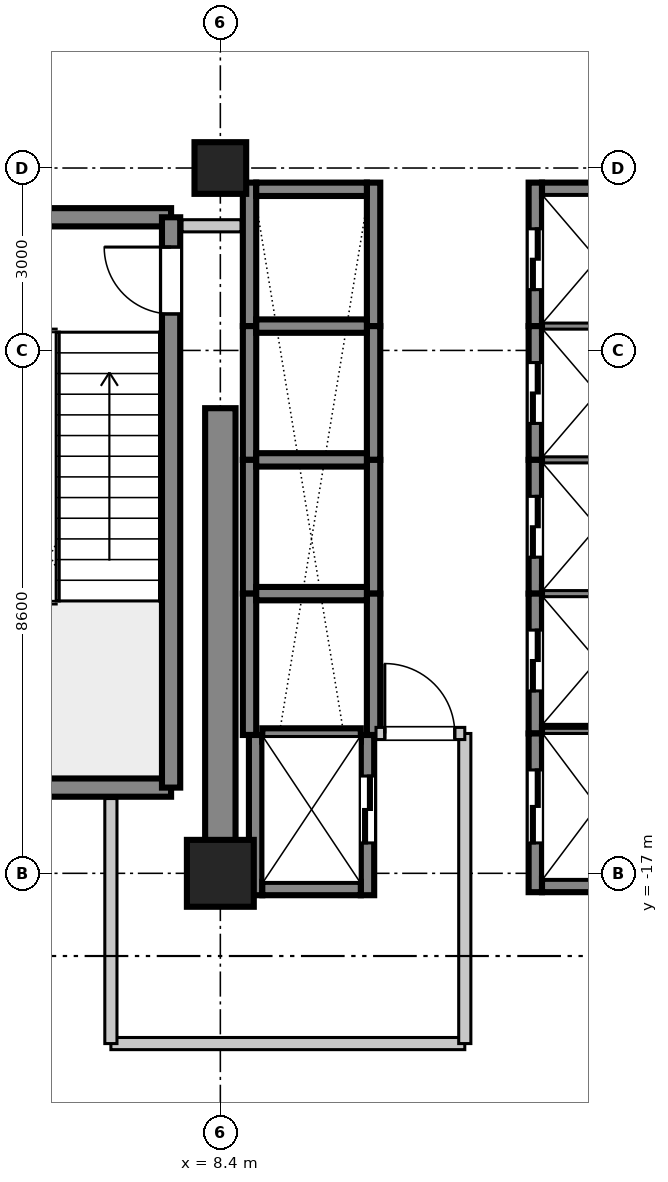
"""IFC4 building model, lengths in metres.
Left out: names, types, materials, properties, quantities, classifications, styles, units other than length and angle.
Written with IfcOpenShell. Run it as: python <this file> out.ifc"""

import sys

from ifc_helpers import new_model, si_unit, direction, frame, frame_2d, origin, origin_2d, place, context, subcontext, project, spatial, rectangle, extrude, source, transform, mapped, element, fill, save


model = new_model("IFC4")
c1 = context("Model", 3, precision=1e-05, world=origin(), true_north=direction((0.0, 1.0)))
c2 = subcontext(c1, "Body", "Model", "MODEL_VIEW")
j1 = project(units=[si_unit("LENGTHUNIT", "METRE"), si_unit("PLANEANGLEUNIT", "RADIAN")], contexts=[c1])
p1 = place(None, origin())
s1 = spatial("IfcSite", under=j1, at=p1, CompositionType="ELEMENT")
p2 = place(p1, origin())
s2 = spatial("IfcBuilding", under=s1, at=p2, CompositionType="ELEMENT")
p3 = place(p2, frame((0.0, 0.0, 200.1)))
s3 = spatial("IfcBuildingStorey", under=s2, at=p3, CompositionType="ELEMENT", Elevation=200.1)
m1 = source(origin(), c2, "Body", "SweptSolid", [
    extrude(rectangle(XDim=1.1, YDim=1.1, at=origin_2d()), origin(), (0.0, 0.0, 1.0), 4.755),
])
p4 = place(p3, frame((8.4, -17.0, 0.0), z_axis=(0.0, 0.0, 1.0), x_axis=(1.0, 0.0, 0.0)))
e1 = element("IfcColumn", 1, at=p4, inside=s3, PredefinedType="COLUMN", context=c2, shape_type="MappedRepresentation", body=[
    mapped(m1, transform((0.0, 0.0, 0.0), scale=1.0)),
])
m2 = source(origin(), c2, "Body", "SweptSolid", [
    extrude(rectangle(XDim=0.85, YDim=0.85, at=origin_2d()), origin(), (0.0, 0.0, 1.0), 4.755),
])
p5 = place(p3, frame((8.4, -5.4, 0.0), z_axis=(0.0, 0.0, 1.0), x_axis=(1.0, 0.0, 0.0)))
e2 = element("IfcColumn", 2, at=p5, inside=s3, PredefinedType="PILASTER", context=c2, shape_type="MappedRepresentation", body=[
    mapped(m2, transform((0.0, 0.0, 0.0), scale=1.0)),
])
m3 = source(origin(), c2, "Body", "SweptSolid", [
    extrude(rectangle(XDim=7.65, YDim=0.5, at=frame_2d((3.825, 0.0))), origin(), (0.0, 0.0, 1.0), 4.51),
])
p6 = place(p3, frame((8.4, -17.0, 0.0), z_axis=(0.0, 0.0, 1.0), x_axis=(0.0, 1.0, 0.0)))
e3 = element("IfcWall", 3, at=p6, inside=s3, PredefinedType="SHEAR", context=c2, shape_type="MappedRepresentation", body=[
    mapped(m3, transform((0.0, 0.0, 0.0), scale=1.0)),
])
m4 = source(origin(), c2, "Body", "SweptSolid", [
    extrude(rectangle(XDim=3.98, YDim=0.3, at=frame_2d((1.99, 0.0))), origin(), (0.0, 0.0, 1.0), 4.51),
])
for number, where, z_axis, x_axis in (
    (4, (3.61, -15.59, 0.0), (0.0, 0.0, 1.0), (1.0, 0.0, 0.0)),
    (5, (3.61, -6.21, 0.0), (0.0, 0.0, 1.0), (1.0, 0.0, 0.0)),
):
    element("IfcWall", number, at=place(p3, frame(where, z_axis=z_axis, x_axis=x_axis)), inside=s3, PredefinedType="SHEAR", context=c2, shape_type="MappedRepresentation", body=[
        mapped(m4, transform((0.0, 0.0, 0.0), scale=1.0)),
    ])
m5 = source(origin(), c2, "Body", "SweptSolid", [
    extrude(rectangle(XDim=9.38, YDim=0.3, at=frame_2d((4.69, 0.0))), origin(), (0.0, 0.0, 1.0), 4.51),
])
p7 = place(p3, frame((7.59, -15.59, 0.0), z_axis=(0.0, 0.0, 1.0), x_axis=(0.0, 1.0, 0.0)))
e6 = element("IfcWall", 6, at=p7, inside=s3, PredefinedType="SHEAR", context=c2, shape_type="MappedRepresentation", body=[
    mapped(m5, transform((0.0, 0.0, 0.0), scale=1.0)),
])
p8 = place(p7, frame((7.79, 0.0, 0.0)))
e7 = element("IfcOpeningElement", 7, at=p8, cuts=e6, PredefinedType="OPENING", context=c2, shape_type="SweptSolid", body=[
    extrude(rectangle(XDim=1.1, YDim=2.15, at=frame_2d((0.55, 1.075))), frame((0.0, 0.16, 0.0), z_axis=(0.0, -1.0, 0.0), x_axis=(1.0, 0.0, 0.0)), (0.0, 0.0, 1.0), 0.32),
])
m6 = source(origin(), c2, "Body", "SweptSolid", [
    extrude(rectangle(XDim=2.36, YDim=0.22, at=frame_2d((1.18, 0.0))), origin(), (0.0, 0.0, 1.0), 4.51),
])
p9 = place(p3, frame((13.58, -8.0, 0.0), z_axis=(0.0, 0.0, 1.0), x_axis=(0.0, 1.0, 0.0)))
e8 = element("IfcWall", 8, at=p9, inside=s3, PredefinedType="SHEAR", context=c2, shape_type="MappedRepresentation", body=[
    mapped(m6, transform((0.0, 0.0, 0.0), scale=1.0)),
])
p10 = place(p9, frame((0.6, 0.0, 0.0)))
e9 = element("IfcOpeningElement", 9, at=p10, cuts=e8, PredefinedType="OPENING", context=c2, shape_type="SweptSolid", body=[
    extrude(rectangle(XDim=1.0, YDim=2.2, at=frame_2d((0.5, 1.1))), frame((0.0, 0.12, 0.0), z_axis=(0.0, -1.0, 0.0), x_axis=(1.0, 0.0, 0.0)), (0.0, 0.0, 1.0), 0.24),
])
m7 = source(origin(), c2, "Body", "SweptSolid", [
    extrude(rectangle(XDim=1.82, YDim=0.22, at=frame_2d((0.91, 0.0))), origin(), (0.0, 0.0, 1.0), 4.51),
])
p11 = place(p3, frame((13.69, -5.75, 0.0), z_axis=(0.0, 0.0, 1.0), x_axis=(1.0, 0.0, 0.0)))
e10 = element("IfcWall", 10, at=p11, inside=s3, PredefinedType="SHEAR", context=c2, shape_type="MappedRepresentation", body=[
    mapped(m7, transform((0.0, 0.0, 0.0), scale=1.0)),
])
m8 = source(origin(), c2, "Body", "SweptSolid", [
    extrude(rectangle(XDim=2.2, YDim=0.22, at=frame_2d((1.1, 0.0))), origin(), (0.0, 0.0, 1.0), 4.51),
])
p12 = place(p3, frame((13.58, -10.2, 0.0), z_axis=(0.0, 0.0, 1.0), x_axis=(0.0, 1.0, 0.0)))
e11 = element("IfcWall", 11, at=p12, inside=s3, PredefinedType="SHEAR", context=c2, shape_type="MappedRepresentation", body=[
    mapped(m8, transform((0.0, 0.0, 0.0), scale=1.0)),
])
p13 = place(p12, frame((0.6, 0.0, 0.0)))
e12 = element("IfcOpeningElement", 12, at=p13, cuts=e11, PredefinedType="OPENING", context=c2, shape_type="SweptSolid", body=[
    extrude(rectangle(XDim=1.0, YDim=2.2, at=frame_2d((0.5, 1.1))), frame((0.0, 0.12, 0.0), z_axis=(0.0, -1.0, 0.0), x_axis=(1.0, 0.0, 0.0)), (0.0, 0.0, 1.0), 0.24),
])
m9 = source(origin(), c2, "Body", "SweptSolid", [
    extrude(rectangle(XDim=1.82, YDim=0.22, at=frame_2d((0.91, 0.0))), origin(), (0.0, 0.0, 1.0), 4.8),
])
p14 = place(p3, frame((13.69, -8.0, 0.0), z_axis=(0.0, 0.0, 1.0), x_axis=(1.0, 0.0, 0.0)))
e13 = element("IfcWall", 13, at=p14, inside=s3, PredefinedType="SHEAR", context=c2, shape_type="MappedRepresentation", body=[
    mapped(m9, transform((0.0, 0.0, 0.0), scale=1.0)),
])
p15 = place(p3, frame((13.58, -12.4, 0.0), z_axis=(0.0, 0.0, 1.0), x_axis=(0.0, 1.0, 0.0)))
e14 = element("IfcWall", 14, at=p15, inside=s3, PredefinedType="SHEAR", context=c2, shape_type="MappedRepresentation", body=[
    mapped(m8, transform((0.0, 0.0, 0.0), scale=1.0)),
])
p16 = place(p15, frame((0.6, 0.0, 0.0)))
e15 = element("IfcOpeningElement", 15, at=p16, cuts=e14, PredefinedType="OPENING", context=c2, shape_type="SweptSolid", body=[
    extrude(rectangle(XDim=1.0, YDim=2.2, at=frame_2d((0.5, 1.1))), frame((0.0, 0.12, 0.0), z_axis=(0.0, -1.0, 0.0), x_axis=(1.0, 0.0, 0.0)), (0.0, 0.0, 1.0), 0.24),
])
p17 = place(p3, frame((13.69, -10.2, 0.0), z_axis=(0.0, 0.0, 1.0), x_axis=(1.0, 0.0, 0.0)))
e16 = element("IfcWall", 16, at=p17, inside=s3, PredefinedType="SHEAR", context=c2, shape_type="MappedRepresentation", body=[
    mapped(m9, transform((0.0, 0.0, 0.0), scale=1.0)),
])
m10 = source(origin(), c2, "Body", "SweptSolid", [
    extrude(rectangle(XDim=2.3, YDim=0.22, at=frame_2d((1.15, 0.0))), origin(), (0.0, 0.0, 1.0), 4.51),
])
p18 = place(p3, frame((13.58, -14.7, 0.0), z_axis=(0.0, 0.0, 1.0), x_axis=(0.0, 1.0, 0.0)))
e17 = element("IfcWall", 17, at=p18, inside=s3, PredefinedType="SHEAR", context=c2, shape_type="MappedRepresentation", body=[
    mapped(m10, transform((0.0, 0.0, 0.0), scale=1.0)),
])
p19 = place(p18, frame((0.7, 0.0, 0.0)))
e18 = element("IfcOpeningElement", 18, at=p19, cuts=e17, PredefinedType="OPENING", context=c2, shape_type="SweptSolid", body=[
    extrude(rectangle(XDim=1.0, YDim=2.2, at=frame_2d((0.5, 1.1))), frame((0.0, 0.12, 0.0), z_axis=(0.0, -1.0, 0.0), x_axis=(1.0, 0.0, 0.0)), (0.0, 0.0, 1.0), 0.24),
])
p20 = place(p3, frame((13.69, -12.4, 0.0), z_axis=(0.0, 0.0, 1.0), x_axis=(1.0, 0.0, 0.0)))
e19 = element("IfcWall", 19, at=p20, inside=s3, PredefinedType="SHEAR", context=c2, shape_type="MappedRepresentation", body=[
    mapped(m9, transform((0.0, 0.0, 0.0), scale=1.0)),
])
for number, where, z_axis, x_axis in (
    (20, (8.88, -8.0, 0.0), (0.0, 0.0, 1.0), (0.0, 1.0, 0.0)),
    (21, (10.92, -8.0, 0.0), (0.0, 0.0, 1.0), (0.0, 1.0, 0.0)),
):
    element("IfcWall", number, at=place(p3, frame(where, z_axis=z_axis, x_axis=x_axis)), inside=s3, PredefinedType="SHEAR", context=c2, shape_type="MappedRepresentation", body=[
        mapped(m6, transform((0.0, 0.0, 0.0), scale=1.0)),
    ])
p21 = place(p3, frame((8.99, -5.75, 0.0), z_axis=(0.0, 0.0, 1.0), x_axis=(1.0, 0.0, 0.0)))
e22 = element("IfcWall", 22, at=p21, inside=s3, PredefinedType="SHEAR", context=c2, shape_type="MappedRepresentation", body=[
    mapped(m7, transform((0.0, 0.0, 0.0), scale=1.0)),
])
for number, where, z_axis, x_axis in (
    (23, (8.88, -10.2, 0.0), (0.0, 0.0, 1.0), (0.0, 1.0, 0.0)),
    (24, (10.92, -10.2, 0.0), (0.0, 0.0, 1.0), (0.0, 1.0, 0.0)),
):
    element("IfcWall", number, at=place(p3, frame(where, z_axis=z_axis, x_axis=x_axis)), inside=s3, PredefinedType="SHEAR", context=c2, shape_type="MappedRepresentation", body=[
        mapped(m8, transform((0.0, 0.0, 0.0), scale=1.0)),
    ])
p22 = place(p3, frame((8.99, -8.0, 0.0), z_axis=(0.0, 0.0, 1.0), x_axis=(1.0, 0.0, 0.0)))
e25 = element("IfcWall", 25, at=p22, inside=s3, PredefinedType="SHEAR", context=c2, shape_type="MappedRepresentation", body=[
    mapped(m9, transform((0.0, 0.0, 0.0), scale=1.0)),
])
for number, where, z_axis, x_axis in (
    (26, (8.88, -12.4, 0.0), (0.0, 0.0, 1.0), (0.0, 1.0, 0.0)),
    (27, (10.92, -12.4, 0.0), (0.0, 0.0, 1.0), (0.0, 1.0, 0.0)),
):
    element("IfcWall", number, at=place(p3, frame(where, z_axis=z_axis, x_axis=x_axis)), inside=s3, PredefinedType="SHEAR", context=c2, shape_type="MappedRepresentation", body=[
        mapped(m8, transform((0.0, 0.0, 0.0), scale=1.0)),
    ])
p23 = place(p3, frame((8.99, -10.2, 0.0), z_axis=(0.0, 0.0, 1.0), x_axis=(1.0, 0.0, 0.0)))
e28 = element("IfcWall", 28, at=p23, inside=s3, PredefinedType="SHEAR", context=c2, shape_type="MappedRepresentation", body=[
    mapped(m9, transform((0.0, 0.0, 0.0), scale=1.0)),
])
m11 = source(origin(), c2, "Body", "SweptSolid", [
    extrude(rectangle(XDim=2.325, YDim=0.22, at=frame_2d((1.163, 0.0))), origin(), (0.0, 0.0, 1.0), 4.51),
])
for number, where, z_axis, x_axis in (
    (29, (8.88, -14.725, 0.0), (0.0, 0.0, 1.0), (0.0, 1.0, 0.0)),
    (30, (10.92, -14.725, 0.0), (0.0, 0.0, 1.0), (0.0, 1.0, 0.0)),
):
    element("IfcWall", number, at=place(p3, frame(where, z_axis=z_axis, x_axis=x_axis)), inside=s3, PredefinedType="SHEAR", context=c2, shape_type="MappedRepresentation", body=[
        mapped(m11, transform((0.0, 0.0, 0.0), scale=1.0)),
    ])
p24 = place(p3, frame((8.99, -12.4, 0.0), z_axis=(0.0, 0.0, 1.0), x_axis=(1.0, 0.0, 0.0)))
e31 = element("IfcWall", 31, at=p24, inside=s3, PredefinedType="SHEAR", context=c2, shape_type="MappedRepresentation", body=[
    mapped(m9, transform((0.0, 0.0, 0.0), scale=1.0)),
])
m12 = source(origin(), c2, "Body", "SweptSolid", [
    extrude(rectangle(XDim=2.635, YDim=0.22, at=frame_2d((1.317, 0.0))), origin(), (0.0, 0.0, 1.0), 4.51),
])
p25 = place(p3, frame((8.98, -17.36, 0.0), z_axis=(0.0, 0.0, 1.0), x_axis=(0.0, 1.0, 0.0)))
e32 = element("IfcWall", 32, at=p25, inside=s3, PredefinedType="SHEAR", context=c2, shape_type="MappedRepresentation", body=[
    mapped(m12, transform((0.0, 0.0, 0.0), scale=1.0)),
])
p26 = place(p3, frame((10.82, -17.36, 0.0), z_axis=(0.0, 0.0, 1.0), x_axis=(0.0, 1.0, 0.0)))
e33 = element("IfcWall", 33, at=p26, inside=s3, PredefinedType="SHEAR", context=c2, shape_type="MappedRepresentation", body=[
    mapped(m12, transform((0.0, 0.0, 0.0), scale=1.0)),
])
p27 = place(p26, frame((0.86, 0.0, 0.0)))
e34 = element("IfcOpeningElement", 34, at=p27, cuts=e33, PredefinedType="OPENING", context=c2, shape_type="SweptSolid", body=[
    extrude(rectangle(XDim=1.1, YDim=2.2, at=frame_2d((0.55, 1.1))), frame((0.0, 0.12, 0.0), z_axis=(0.0, -1.0, 0.0), x_axis=(1.0, 0.0, 0.0)), (0.0, 0.0, 1.0), 0.24),
])
m13 = source(origin(), c2, "Body", "SweptSolid", [
    extrude(rectangle(XDim=1.62, YDim=0.22, at=frame_2d((0.81, 0.0))), origin(), (0.0, 0.0, 1.0), 4.51),
])
p28 = place(p3, frame((9.09, -17.25, 0.0), z_axis=(0.0, 0.0, 1.0), x_axis=(1.0, 0.0, 0.0)))
e35 = element("IfcWall", 35, at=p28, inside=s3, PredefinedType="SHEAR", context=c2, shape_type="MappedRepresentation", body=[
    mapped(m13, transform((0.0, 0.0, 0.0), scale=1.0)),
])
m14 = source(origin(), c2, "Body", "SweptSolid", [
    extrude(rectangle(XDim=1.62, YDim=0.22, at=frame_2d((0.81, 0.0))), origin(), (0.0, 0.0, 1.0), 4.8),
])
p29 = place(p3, frame((9.09, -14.725, 0.0), z_axis=(0.0, 0.0, 1.0), x_axis=(1.0, 0.0, 0.0)))
e36 = element("IfcWall", 36, at=p29, inside=s3, PredefinedType="SHEAR", context=c2, shape_type="MappedRepresentation", body=[
    mapped(m14, transform((0.0, 0.0, 0.0), scale=1.0)),
])
m15 = source(origin(), c2, "Body", "SweptSolid", [
    extrude(rectangle(XDim=2.61, YDim=0.22, at=frame_2d((1.305, 0.0))), origin(), (0.0, 0.0, 1.0), 4.51),
])
p30 = place(p3, frame((13.58, -17.31, 0.0), z_axis=(0.0, 0.0, 1.0), x_axis=(0.0, 1.0, 0.0)))
e37 = element("IfcWall", 37, at=p30, inside=s3, PredefinedType="SHEAR", context=c2, shape_type="MappedRepresentation", body=[
    mapped(m15, transform((0.0, 0.0, 0.0), scale=1.0)),
])
p31 = place(p30, frame((0.81, 0.0, 0.0)))
e38 = element("IfcOpeningElement", 38, at=p31, cuts=e37, PredefinedType="OPENING", context=c2, shape_type="SweptSolid", body=[
    extrude(rectangle(XDim=1.2, YDim=2.2, at=frame_2d((0.6, 1.1))), frame((0.0, 0.12, 0.0), z_axis=(0.0, -1.0, 0.0), x_axis=(1.0, 0.0, 0.0)), (0.0, 0.0, 1.0), 0.24),
])
p32 = place(p3, frame((13.69, -17.2, 0.0), z_axis=(0.0, 0.0, 1.0), x_axis=(1.0, 0.0, 0.0)))
e39 = element("IfcWall", 39, at=p32, inside=s3, PredefinedType="SHEAR", context=c2, shape_type="MappedRepresentation", body=[
    mapped(m7, transform((0.0, 0.0, 0.0), scale=1.0)),
])
p33 = place(p3, frame((13.69, -14.7, 0.0), z_axis=(0.0, 0.0, 1.0), x_axis=(1.0, 0.0, 0.0)))
e40 = element("IfcWall", 40, at=p33, inside=s3, PredefinedType="SHEAR", context=c2, shape_type="MappedRepresentation", body=[
    mapped(m9, transform((0.0, 0.0, 0.0), scale=1.0)),
])
m16 = source(origin(), c2, "Body", "SweptSolid", [
    extrude(rectangle(XDim=5.82, YDim=0.2, at=frame_2d((2.91, 0.0))), origin(), (0.0, 0.0, 1.0), 3.4),
])
p34 = place(p3, frame((6.6, -19.8, 0.0), z_axis=(0.0, 0.0, 1.0), x_axis=(1.0, 0.0, 0.0)))
e41 = element("IfcWall", 41, at=p34, inside=s3, PredefinedType="PARTITIONING", context=c2, shape_type="MappedRepresentation", body=[
    mapped(m16, transform((0.0, 0.0, 0.0), scale=1.0)),
])
m17 = source(origin(), c2, "Body", "SweptSolid", [
    extrude(rectangle(XDim=4.03, YDim=0.2, at=frame_2d((2.015, 0.0))), origin(), (0.0, 0.0, 1.0), 3.4),
])
p35 = place(p3, frame((6.6, -19.8, 0.0), z_axis=(0.0, 0.0, 1.0), x_axis=(0.0, 1.0, 0.0)))
e42 = element("IfcWall", 42, at=p35, inside=s3, PredefinedType="PARTITIONING", context=c2, shape_type="MappedRepresentation", body=[
    mapped(m17, transform((0.0, 0.0, 0.0), scale=1.0)),
])
m18 = source(origin(), c2, "Body", "SweptSolid", [
    extrude(rectangle(XDim=5.1, YDim=0.2, at=frame_2d((2.55, 0.0))), origin(), (0.0, 0.0, 1.0), 3.4),
])
p36 = place(p3, frame((12.42, -19.8, 0.0), z_axis=(0.0, 0.0, 1.0), x_axis=(0.0, 1.0, 0.0)))
e43 = element("IfcWall", 43, at=p36, inside=s3, PredefinedType="PARTITIONING", context=c2, shape_type="MappedRepresentation", body=[
    mapped(m18, transform((0.0, 0.0, 0.0), scale=1.0)),
])
m19 = source(origin(), c2, "Body", "SweptSolid", [
    extrude(rectangle(XDim=1.46, YDim=0.2, at=frame_2d((0.73, 0.0))), origin(), (0.0, 0.0, 1.0), 3.4),
])
p37 = place(p3, frame((10.96, -14.7, 0.0), z_axis=(0.0, 0.0, 1.0), x_axis=(1.0, 0.0, 0.0)))
e44 = element("IfcWall", 44, at=p37, inside=s3, PredefinedType="PARTITIONING", context=c2, shape_type="MappedRepresentation", body=[
    mapped(m19, transform((0.0, 0.0, 0.0), scale=1.0)),
])
p38 = place(p37, frame((0.145, 0.0, 0.0)))
e45 = element("IfcOpeningElement", 45, at=p38, cuts=e44, PredefinedType="OPENING", context=c2, shape_type="SweptSolid", body=[
    extrude(rectangle(XDim=1.15, YDim=2.15, at=frame_2d((0.575, 1.075))), frame((0.0, 0.11, 0.0), z_axis=(0.0, -1.0, 0.0), x_axis=(1.0, 0.0, 0.0)), (0.0, 0.0, 1.0), 0.22),
])
m20 = source(origin(), c2, "Body", "SweptSolid", [
    extrude(rectangle(XDim=0.97, YDim=0.2, at=frame_2d((0.485, 0.0))), origin(), (0.0, 0.0, 1.0), 3.4),
])
p39 = place(p3, frame((7.77, -6.35, 0.0), z_axis=(0.0, 0.0, 1.0), x_axis=(1.0, 0.0, 0.0)))
e46 = element("IfcWall", 46, at=p39, inside=s3, PredefinedType="PARTITIONING", context=c2, shape_type="MappedRepresentation", body=[
    mapped(m20, transform((0.0, 0.0, 0.0), scale=1.0)),
])
m21 = source(origin(), c2, "Body", "SweptSolid", [
    extrude(rectangle(XDim=1.1, YDim=2.15, at=frame_2d((0.55, 1.075))), frame((0.0, 0.025, 0.0), z_axis=(0.0, -1.0, 0.0), x_axis=(1.0, 0.0, 0.0)), (0.0, 0.0, 1.0), 0.05),
])
p40 = place(p8, origin())
e47 = element("IfcDoor", 47, at=p40, inside=s3, OperationType="SINGLE_SWING_RIGHT", PredefinedType="DOOR", context=c2, shape_type="MappedRepresentation", body=[
    mapped(m21, transform((0.0, 0.0, 0.0), scale=1.0)),
])
fill(e7, e47)
m22 = source(origin(), c2, "Body", "SweptSolid", [
    extrude(rectangle(XDim=1.0, YDim=2.2, at=frame_2d((0.5, 1.1))), frame((0.0, 0.025, 0.0), z_axis=(0.0, -1.0, 0.0), x_axis=(1.0, 0.0, 0.0)), (0.0, 0.0, 1.0), 0.05),
])
p41 = place(p10, origin())
e48 = element("IfcDoor", 48, at=p41, inside=s3, OperationType="DOUBLE_DOOR_SLIDING", PredefinedType="DOOR", context=c2, shape_type="MappedRepresentation", body=[
    mapped(m22, transform((0.0, 0.0, 0.0), scale=1.0)),
])
fill(e9, e48)
p42 = place(p13, origin())
e49 = element("IfcDoor", 49, at=p42, inside=s3, OperationType="DOUBLE_DOOR_SLIDING", PredefinedType="DOOR", context=c2, shape_type="MappedRepresentation", body=[
    mapped(m22, transform((0.0, 0.0, 0.0), scale=1.0)),
])
fill(e12, e49)
p43 = place(p16, origin())
e50 = element("IfcDoor", 50, at=p43, inside=s3, OperationType="DOUBLE_DOOR_SLIDING", PredefinedType="DOOR", context=c2, shape_type="MappedRepresentation", body=[
    mapped(m22, transform((0.0, 0.0, 0.0), scale=1.0)),
])
fill(e15, e50)
p44 = place(p19, origin())
e51 = element("IfcDoor", 51, at=p44, inside=s3, OperationType="DOUBLE_DOOR_SLIDING", PredefinedType="DOOR", context=c2, shape_type="MappedRepresentation", body=[
    mapped(m22, transform((0.0, 0.0, 0.0), scale=1.0)),
])
fill(e18, e51)
m23 = source(origin(), c2, "Body", "SweptSolid", [
    extrude(rectangle(XDim=1.1, YDim=2.2, at=frame_2d((0.55, 1.1))), frame((0.0, 0.025, 0.0), z_axis=(0.0, -1.0, 0.0), x_axis=(1.0, 0.0, 0.0)), (0.0, 0.0, 1.0), 0.05),
])
p45 = place(p27, frame((1.1, 0.0, 0.0), z_axis=(0.0, 0.0, 1.0), x_axis=(-1.0, 0.0, 0.0)))
e52 = element("IfcDoor", 52, at=p45, inside=s3, OperationType="DOUBLE_DOOR_SLIDING", PredefinedType="DOOR", context=c2, shape_type="MappedRepresentation", body=[
    mapped(m23, transform((0.0, 0.0, 0.0), scale=1.0)),
])
fill(e34, e52)
m24 = source(origin(), c2, "Body", "SweptSolid", [
    extrude(rectangle(XDim=1.2, YDim=2.2, at=frame_2d((0.6, 1.1))), frame((0.0, 0.025, 0.0), z_axis=(0.0, -1.0, 0.0), x_axis=(1.0, 0.0, 0.0)), (0.0, 0.0, 1.0), 0.05),
])
p46 = place(p31, origin())
e53 = element("IfcDoor", 53, at=p46, inside=s3, OperationType="DOUBLE_DOOR_SLIDING", PredefinedType="DOOR", context=c2, shape_type="MappedRepresentation", body=[
    mapped(m24, transform((0.0, 0.0, 0.0), scale=1.0)),
])
fill(e38, e53)
m25 = source(origin(), c2, "Body", "SweptSolid", [
    extrude(rectangle(XDim=1.15, YDim=2.15, at=frame_2d((0.575, 1.075))), frame((0.0, 0.025, 0.0), z_axis=(0.0, -1.0, 0.0), x_axis=(1.0, 0.0, 0.0)), (0.0, 0.0, 1.0), 0.05),
])
p47 = place(p38, origin())
e54 = element("IfcDoor", 54, at=p47, inside=s3, OperationType="SINGLE_SWING_LEFT", PredefinedType="DOOR", context=c2, shape_type="MappedRepresentation", body=[
    mapped(m25, transform((0.0, 0.0, 0.0), scale=1.0)),
])
fill(e45, e54)
save(model, sys.argv[1])
